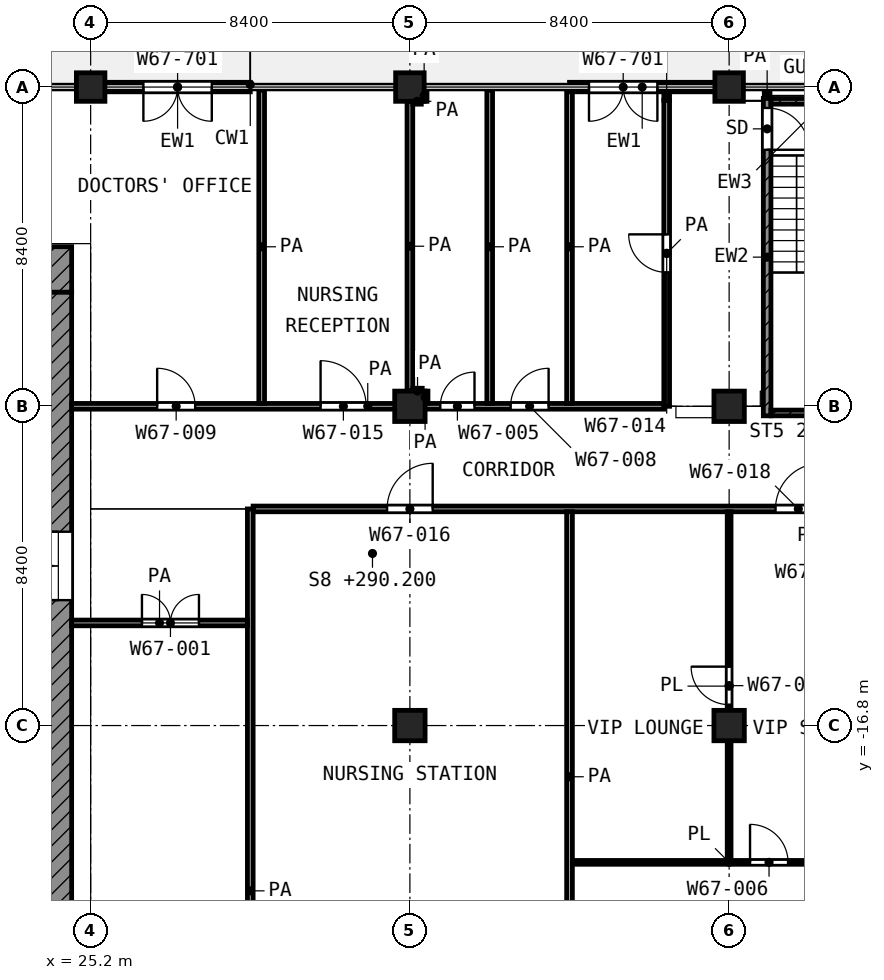
"""IFC4 building model, lengths in metres.
Left out: names, types, materials, properties, quantities, classifications, styles, units other than length and angle.
Written with IfcOpenShell. Run it as: python <this file> out.ifc"""

import sys

from ifc_helpers import new_model, si_unit, direction, frame, frame_2d, origin, origin_2d, place, context, subcontext, project, spatial, rectangle, extrude, element, fill, save


model = new_model("IFC4")
c1 = context("Model", 3, precision=1e-05, world=origin(), true_north=direction((0.0, 1.0)))
c2 = subcontext(c1, "Body", "Model", "MODEL_VIEW")
j1 = project(units=[si_unit("LENGTHUNIT", "METRE"), si_unit("PLANEANGLEUNIT", "RADIAN")], contexts=[c1])
p1 = place(None, origin())
s1 = spatial("IfcSite", under=j1, at=p1, CompositionType="ELEMENT")
p2 = place(p1, origin())
s2 = spatial("IfcBuilding", under=s1, at=p2, CompositionType="ELEMENT")
p3 = place(p2, frame((0.0, 0.0, 290.2)))
s3 = spatial("IfcBuildingStorey", under=s2, at=p3, CompositionType="ELEMENT", Elevation=290.2)
for number, where, z_axis, x_axis in (
    (1, (25.2, 0.0, 0.0), (0.0, 0.0, 1.0), (1.0, 0.0, 0.0)),
    (2, (33.6, 0.0, 0.0), (0.0, 0.0, 1.0), (1.0, 0.0, 0.0)),
    (3, (42.0, 0.0, 0.0), (0.0, 0.0, 1.0), (1.0, 0.0, 0.0)),
):
    element("IfcColumn", number, at=place(p3, frame(where, z_axis=z_axis, x_axis=x_axis)), inside=s3, PredefinedType="COLUMN", context=c2, shape_type="SweptSolid", body=[
        extrude(rectangle(XDim=0.75, YDim=0.75, at=origin_2d()), origin(), (0.0, 0.0, 1.0), 4.2),
    ])
for number, where, z_axis, x_axis in (
    (4, (33.6, -8.4, 0.0), (0.0, 0.0, 1.0), (1.0, 0.0, 0.0)),
    (5, (42.0, -8.4, 0.0), (0.0, 0.0, 1.0), (1.0, 0.0, 0.0)),
    (6, (33.6, -16.8, 0.0), (0.0, 0.0, 1.0), (1.0, 0.0, 0.0)),
    (7, (42.0, -16.8, 0.0), (0.0, 0.0, 1.0), (1.0, 0.0, 0.0)),
):
    element("IfcColumn", number, at=place(p3, frame(where, z_axis=z_axis, x_axis=x_axis)), inside=s3, PredefinedType="COLUMN", context=c2, shape_type="SweptSolid", body=[
        extrude(rectangle(XDim=0.8, YDim=0.8, at=origin_2d()), origin(), (0.0, 0.0, 1.0), 4.2),
    ])
p4 = place(p3, frame((41.625, 0.0, 0.0), z_axis=(0.0, 0.0, 1.0), x_axis=(-1.0, 0.0, 0.0)))
e8 = element("IfcWall", 8, at=p4, inside=s3, PredefinedType="SOLIDWALL", context=c2, shape_type="SweptSolid", body=[
    extrude(rectangle(XDim=3.825, YDim=0.25, at=frame_2d((1.913, 0.0))), origin(), (0.0, 0.0, 1.0), 3.48),
])
p5 = place(p4, frame((1.512, 0.0, 0.0)))
e9 = element("IfcOpeningElement", 9, at=p5, cuts=e8, PredefinedType="OPENING", context=c2, shape_type="SweptSolid", body=[
    extrude(rectangle(XDim=1.8, YDim=2.1, at=frame_2d((0.9, 1.05))), frame((0.0, 0.135, 0.0), z_axis=(0.0, -1.0, 0.0), x_axis=(1.0, 0.0, 0.0)), (0.0, 0.0, 1.0), 0.27),
])
p6 = place(p3, frame((29.4, 0.0, 0.0), z_axis=(0.0, 0.0, 1.0), x_axis=(-1.0, 0.0, 0.0)))
e10 = element("IfcWall", 10, at=p6, inside=s3, PredefinedType="SOLIDWALL", context=c2, shape_type="SweptSolid", body=[
    extrude(rectangle(XDim=3.825, YDim=0.25, at=frame_2d((1.913, 0.0))), origin(), (0.0, 0.0, 1.0), 3.48),
])
p7 = place(p6, frame((1.012, 0.0, 0.0)))
e11 = element("IfcOpeningElement", 11, at=p7, cuts=e10, PredefinedType="OPENING", context=c2, shape_type="SweptSolid", body=[
    extrude(rectangle(XDim=1.8, YDim=2.1, at=frame_2d((0.9, 1.05))), frame((0.0, 0.135, 0.0), z_axis=(0.0, -1.0, 0.0), x_axis=(1.0, 0.0, 0.0)), (0.0, 0.0, 1.0), 0.27),
])
p8 = place(p3, frame((4.2, -4.8, 0.0), z_axis=(0.0, 0.0, 1.0), x_axis=(1.0, 0.0, 0.0)))
e12 = element("IfcWall", 12, at=p8, inside=s3, PredefinedType="SHEAR", context=c2, shape_type="SweptSolid", body=[
    extrude(rectangle(XDim=20.5, YDim=1.2, at=frame_2d((10.25, 0.0))), origin(), (0.0, 0.0, 1.0), 3.6),
])
p9 = place(p8, frame((1.95, 0.0, 0.0)))
e13 = element("IfcOpeningElement", 13, at=p9, cuts=e12, PredefinedType="OPENING", context=c2, shape_type="SweptSolid", body=[
    extrude(rectangle(XDim=1.1, YDim=2.1, at=frame_2d((0.55, 1.05))), frame((0.0, 0.61, 0.0), z_axis=(0.0, -1.0, 0.0), x_axis=(1.0, 0.0, 0.0)), (0.0, 0.0, 1.0), 1.22),
])
p10 = place(p8, frame((17.95, 0.0, 0.0)))
e14 = element("IfcOpeningElement", 14, at=p10, cuts=e12, PredefinedType="OPENING", context=c2, shape_type="SweptSolid", body=[
    extrude(rectangle(XDim=1.1, YDim=2.1, at=frame_2d((0.55, 1.05))), frame((0.0, 0.61, 0.0), z_axis=(0.0, -1.0, 0.0), x_axis=(1.0, 0.0, 0.0)), (0.0, 0.0, 1.0), 1.22),
])
p11 = place(p3, frame((24.35, -24.0, 0.0), z_axis=(0.0, 0.0, 1.0), x_axis=(0.0, 1.0, 0.0)))
e15 = element("IfcWall", 15, at=p11, inside=s3, PredefinedType="SHEAR", context=c2, shape_type="SweptSolid", body=[
    extrude(rectangle(XDim=18.6, YDim=0.7, at=frame_2d((9.3, 0.0))), origin(), (0.0, 0.0, 1.0), 3.6),
])
p12 = place(p11, frame((10.5, 0.0, 0.0)))
e16 = element("IfcOpeningElement", 16, at=p12, cuts=e15, PredefinedType="OPENING", context=c2, shape_type="SweptSolid", body=[
    extrude(rectangle(XDim=1.8, YDim=2.1, at=frame_2d((0.9, 1.05))), frame((0.0, 0.36, 0.0), z_axis=(0.0, -1.0, 0.0), x_axis=(1.0, 0.0, 0.0)), (0.0, 0.0, 1.0), 0.72),
])
p13 = place(p3, frame((43.0, -8.65, 0.0), z_axis=(0.0, 0.0, 1.0), x_axis=(0.0, 1.0, 0.0)))
e17 = element("IfcWall", 17, at=p13, inside=s3, PredefinedType="SHEAR", context=c2, shape_type="SweptSolid", body=[
    extrude(rectangle(XDim=8.35, YDim=0.2, at=frame_2d((4.175, 0.0))), origin(), (0.0, 0.0, 1.0), 3.6),
])
p14 = place(p13, frame((7.0, 0.0, 0.0)))
e18 = element("IfcOpeningElement", 18, at=p14, cuts=e17, PredefinedType="OPENING", context=c2, shape_type="SweptSolid", body=[
    extrude(rectangle(XDim=1.1, YDim=2.1, at=frame_2d((0.55, 1.05))), frame((0.0, 0.11, 0.0), z_axis=(0.0, -1.0, 0.0), x_axis=(1.0, 0.0, 0.0)), (0.0, 0.0, 1.0), 0.22),
])
for number, where, z_axis, x_axis in (
    (19, (43.1, -0.375, 0.0), (0.0, 0.0, 1.0), (1.0, 0.0, 0.0)),
    (20, (43.1, -8.575, 0.0), (0.0, 0.0, 1.0), (1.0, 0.0, 0.0)),
):
    element("IfcWall", number, at=place(p3, frame(where, z_axis=z_axis, x_axis=x_axis)), inside=s3, PredefinedType="SHEAR", context=c2, shape_type="SweptSolid", body=[
        extrude(rectangle(XDim=2.85, YDim=0.15, at=frame_2d((1.425, 0.0))), origin(), (0.0, 0.0, 1.0), 3.6),
    ])
p15 = place(p3, frame((37.875, -20.4, 0.0), z_axis=(0.0, 0.0, 1.0), x_axis=(1.0, 0.0, 0.0)))
e21 = element("IfcWall", 21, at=p15, inside=s3, PredefinedType="PARTITIONING", context=c2, shape_type="SweptSolid", body=[
    extrude(rectangle(XDim=8.25, YDim=0.1, at=frame_2d((4.125, 0.0))), origin(), (0.0, 0.0, 1.0), 3.6),
])
p16 = place(p15, frame((4.675, 0.0, 0.0)))
e22 = element("IfcOpeningElement", 22, at=p16, cuts=e21, PredefinedType="OPENING", context=c2, shape_type="SweptSolid", body=[
    extrude(rectangle(XDim=1.0, YDim=2.1, at=frame_2d((0.5, 1.05))), frame((0.0, 0.06, 0.0), z_axis=(0.0, -1.0, 0.0), x_axis=(1.0, 0.0, 0.0)), (0.0, 0.0, 1.0), 0.12),
])
p17 = place(p3, frame((42.0, -20.35, 0.0), z_axis=(0.0, 0.0, 1.0), x_axis=(0.0, 1.0, 0.0)))
e23 = element("IfcWall", 23, at=p17, inside=s3, PredefinedType="PARTITIONING", context=c2, shape_type="SweptSolid", body=[
    extrude(rectangle(XDim=9.175, YDim=0.1, at=frame_2d((4.587, 0.0))), origin(), (0.0, 0.0, 1.0), 3.6),
])
p18 = place(p17, frame((4.1, 0.0, 0.0)))
e24 = element("IfcOpeningElement", 24, at=p18, cuts=e23, PredefinedType="OPENING", context=c2, shape_type="SweptSolid", body=[
    extrude(rectangle(XDim=1.0, YDim=2.1, at=frame_2d((0.5, 1.05))), frame((0.0, 0.06, 0.0), z_axis=(0.0, -1.0, 0.0), x_axis=(1.0, 0.0, 0.0)), (0.0, 0.0, 1.0), 0.12),
])
p19 = place(p3, frame((24.7, -14.1, 0.0), z_axis=(0.0, 0.0, 1.0), x_axis=(1.0, 0.0, 0.0)))
e25 = element("IfcWall", 25, at=p19, inside=s3, PredefinedType="PARTITIONING", context=c2, shape_type="SweptSolid", body=[
    extrude(rectangle(XDim=4.625, YDim=0.15, at=frame_2d((2.312, 0.0))), origin(), (0.0, 0.0, 1.0), 3.6),
])
p20 = place(p19, frame((1.85, 0.0, 0.0)))
e26 = element("IfcOpeningElement", 26, at=p20, cuts=e25, PredefinedType="OPENING", context=c2, shape_type="SweptSolid", body=[
    extrude(rectangle(XDim=1.5, YDim=2.1, at=frame_2d((0.75, 1.05))), frame((0.0, 0.085, 0.0), z_axis=(0.0, -1.0, 0.0), x_axis=(1.0, 0.0, 0.0)), (0.0, 0.0, 1.0), 0.17),
])
p21 = place(p3, frame((29.475, -11.1, 0.0), z_axis=(0.0, 0.0, 1.0), x_axis=(1.0, 0.0, 0.0)))
e27 = element("IfcWall", 27, at=p21, inside=s3, PredefinedType="PARTITIONING", context=c2, shape_type="SweptSolid", body=[
    extrude(rectangle(XDim=29.245, YDim=0.15, at=frame_2d((14.623, 0.0))), origin(), (0.0, 0.0, 1.0), 3.6),
])
p22 = place(p21, frame((3.525, 0.0, 0.0)))
e28 = element("IfcOpeningElement", 28, at=p22, cuts=e27, PredefinedType="OPENING", context=c2, shape_type="SweptSolid", body=[
    extrude(rectangle(XDim=1.2, YDim=2.1, at=frame_2d((0.6, 1.05))), frame((0.0, 0.085, 0.0), z_axis=(0.0, -1.0, 0.0), x_axis=(1.0, 0.0, 0.0)), (0.0, 0.0, 1.0), 0.17),
])
p23 = place(p21, frame((15.285, 0.0, 0.0)))
e29 = element("IfcOpeningElement", 29, at=p23, cuts=e27, PredefinedType="OPENING", context=c2, shape_type="SweptSolid", body=[
    extrude(rectangle(XDim=1.2, YDim=2.1, at=frame_2d((0.6, 1.05))), frame((0.0, 0.085, 0.0), z_axis=(0.0, -1.0, 0.0), x_axis=(1.0, 0.0, 0.0)), (0.0, 0.0, 1.0), 0.17),
])
p24 = place(p21, frame((13.745, 0.0, 0.0)))
e30 = element("IfcOpeningElement", 30, at=p24, cuts=e27, PredefinedType="OPENING", context=c2, shape_type="SweptSolid", body=[
    extrude(rectangle(XDim=1.2, YDim=2.1, at=frame_2d((0.6, 1.05))), frame((0.0, 0.085, 0.0), z_axis=(0.0, -1.0, 0.0), x_axis=(1.0, 0.0, 0.0)), (0.0, 0.0, 1.0), 0.17),
])
p25 = place(p21, frame((18.325, 0.0, 0.0)))
e31 = element("IfcOpeningElement", 31, at=p25, cuts=e27, PredefinedType="OPENING", context=c2, shape_type="SweptSolid", body=[
    extrude(rectangle(XDim=1.0, YDim=2.1, at=frame_2d((0.5, 1.05))), frame((0.0, 0.085, 0.0), z_axis=(0.0, -1.0, 0.0), x_axis=(1.0, 0.0, 0.0)), (0.0, 0.0, 1.0), 0.17),
])
p26 = place(p21, frame((24.375, 0.0, 0.0)))
e32 = element("IfcOpeningElement", 32, at=p26, cuts=e27, PredefinedType="OPENING", context=c2, shape_type="SweptSolid", body=[
    extrude(rectangle(XDim=1.5, YDim=2.1, at=frame_2d((0.75, 1.05))), frame((0.0, 0.085, 0.0), z_axis=(0.0, -1.0, 0.0), x_axis=(1.0, 0.0, 0.0)), (0.0, 0.0, 1.0), 0.17),
])
p27 = place(p3, frame((24.7, -8.4, 0.0), z_axis=(0.0, 0.0, 1.0), x_axis=(1.0, 0.0, 0.0)))
e33 = element("IfcWall", 33, at=p27, inside=s3, PredefinedType="PARTITIONING", context=c2, shape_type="SweptSolid", body=[
    extrude(rectangle(XDim=15.582, YDim=0.15, at=frame_2d((7.791, 0.0))), origin(), (0.0, 0.0, 1.0), 3.6),
])
p28 = place(p27, frame((2.25, 0.0, 0.0)))
e34 = element("IfcOpeningElement", 34, at=p28, cuts=e33, PredefinedType="OPENING", context=c2, shape_type="SweptSolid", body=[
    extrude(rectangle(XDim=1.0, YDim=2.1, at=frame_2d((0.5, 1.05))), frame((0.0, 0.085, 0.0), z_axis=(0.0, -1.0, 0.0), x_axis=(1.0, 0.0, 0.0)), (0.0, 0.0, 1.0), 0.17),
])
p29 = place(p27, frame((6.55, 0.0, 0.0)))
e35 = element("IfcOpeningElement", 35, at=p29, cuts=e33, PredefinedType="OPENING", context=c2, shape_type="SweptSolid", body=[
    extrude(rectangle(XDim=1.2, YDim=2.1, at=frame_2d((0.6, 1.05))), frame((0.0, 0.085, 0.0), z_axis=(0.0, -1.0, 0.0), x_axis=(1.0, 0.0, 0.0)), (0.0, 0.0, 1.0), 0.17),
])
p30 = place(p27, frame((9.7, 0.0, 0.0)))
e36 = element("IfcOpeningElement", 36, at=p30, cuts=e33, PredefinedType="OPENING", context=c2, shape_type="SweptSolid", body=[
    extrude(rectangle(XDim=0.9, YDim=2.1, at=frame_2d((0.45, 1.05))), frame((0.0, 0.085, 0.0), z_axis=(0.0, -1.0, 0.0), x_axis=(1.0, 0.0, 0.0)), (0.0, 0.0, 1.0), 0.17),
])
p31 = place(p27, frame((11.55, 0.0, 0.0)))
e37 = element("IfcOpeningElement", 37, at=p31, cuts=e33, PredefinedType="OPENING", context=c2, shape_type="SweptSolid", body=[
    extrude(rectangle(XDim=1.0, YDim=2.1, at=frame_2d((0.5, 1.05))), frame((0.0, 0.085, 0.0), z_axis=(0.0, -1.0, 0.0), x_axis=(1.0, 0.0, 0.0)), (0.0, 0.0, 1.0), 0.17),
])
p32 = place(p3, frame((33.677, -8.0, 0.0), z_axis=(0.0, 0.0, 1.0), x_axis=(1.0, 0.0, 0.0)))
e38 = element("IfcWall", 38, at=p32, inside=s3, PredefinedType="PARTITIONING", context=c2, shape_type="SweptSolid", body=[
    extrude(rectangle(XDim=0.248, YDim=0.15, at=frame_2d((0.124, 0.0))), origin(), (0.0, 0.0, 1.0), 3.6),
])
p33 = place(p3, frame((33.678, -0.375, 0.0), z_axis=(0.0, 0.0, 1.0), x_axis=(1.0, 0.0, 0.0)))
e39 = element("IfcWall", 39, at=p33, inside=s3, PredefinedType="PARTITIONING", context=c2, shape_type="SweptSolid", body=[
    extrude(rectangle(XDim=0.222, YDim=0.15, at=frame_2d((0.111, 0.0))), origin(), (0.0, 0.0, 1.0), 3.6),
])
p34 = place(p3, frame((29.4, -31.198, 0.0), z_axis=(0.0, 0.0, 1.0), x_axis=(0.0, 1.0, 0.0)))
e40 = element("IfcWall", 40, at=p34, inside=s3, PredefinedType="PARTITIONING", context=c2, shape_type="SweptSolid", body=[
    extrude(rectangle(XDim=20.098, YDim=0.15, at=frame_2d((10.049, 0.0))), origin(), (0.0, 0.0, 1.0), 3.6),
])
p35 = place(p3, frame((29.7, -8.325, 0.0), z_axis=(0.0, 0.0, 1.0), x_axis=(0.0, 1.0, 0.0)))
e41 = element("IfcWall", 41, at=p35, inside=s3, PredefinedType="PARTITIONING", context=c2, shape_type="SweptSolid", body=[
    extrude(rectangle(XDim=8.245, YDim=0.15, at=frame_2d((4.123, 0.0))), origin(), (0.0, 0.0, 1.0), 3.6),
])
p36 = place(p3, frame((33.6, -7.998, 0.0), z_axis=(0.0, 0.0, 1.0), x_axis=(0.0, 1.0, 0.0)))
e42 = element("IfcWall", 42, at=p36, inside=s3, PredefinedType="PARTITIONING", context=c2, shape_type="SweptSolid", body=[
    extrude(rectangle(XDim=7.62, YDim=0.15, at=frame_2d((3.81, 0.0))), origin(), (0.0, 0.0, 1.0), 3.6),
])
p37 = place(p3, frame((33.975, -0.375, 0.0), z_axis=(0.0, 0.0, 1.0), x_axis=(0.0, 1.0, 0.0)))
e43 = element("IfcWall", 43, at=p37, inside=s3, PredefinedType="PARTITIONING", context=c2, shape_type="SweptSolid", body=[
    extrude(rectangle(XDim=0.295, YDim=0.15, at=frame_2d((0.147, 0.0))), origin(), (0.0, 0.0, 1.0), 3.6),
])
p38 = place(p3, frame((34.0, -8.325, 0.0), z_axis=(0.0, 0.0, 1.0), x_axis=(0.0, 1.0, 0.0)))
e44 = element("IfcWall", 44, at=p38, inside=s3, PredefinedType="PARTITIONING", context=c2, shape_type="SweptSolid", body=[
    extrude(rectangle(XDim=0.325, YDim=0.15, at=frame_2d((0.163, 0.0))), origin(), (0.0, 0.0, 1.0), 3.6),
])
p39 = place(p3, frame((35.7, -8.325, 0.0), z_axis=(0.0, 0.0, 1.0), x_axis=(0.0, 1.0, 0.0)))
e45 = element("IfcWall", 45, at=p39, inside=s3, PredefinedType="PARTITIONING", context=c2, shape_type="SweptSolid", body=[
    extrude(rectangle(XDim=8.245, YDim=0.15, at=frame_2d((4.123, 0.0))), origin(), (0.0, 0.0, 1.0), 3.6),
])
p40 = place(p3, frame((37.8, -25.12, 0.0), z_axis=(0.0, 0.0, 1.0), x_axis=(0.0, 1.0, 0.0)))
e46 = element("IfcWall", 46, at=p40, inside=s3, PredefinedType="PARTITIONING", context=c2, shape_type="SweptSolid", body=[
    extrude(rectangle(XDim=13.945, YDim=0.15, at=frame_2d((6.973, 0.0))), origin(), (0.0, 0.0, 1.0), 3.6),
])
p41 = place(p3, frame((37.8, -8.325, 0.0), z_axis=(0.0, 0.0, 1.0), x_axis=(0.0, 1.0, 0.0)))
e47 = element("IfcWall", 47, at=p41, inside=s3, PredefinedType="PARTITIONING", context=c2, shape_type="SweptSolid", body=[
    extrude(rectangle(XDim=8.245, YDim=0.15, at=frame_2d((4.123, 0.0))), origin(), (0.0, 0.0, 1.0), 3.6),
])
p42 = place(p3, frame((40.357, -8.4, 0.0), z_axis=(0.0, 0.0, 1.0), x_axis=(0.0, 1.0, 0.0)))
e48 = element("IfcWall", 48, at=p42, inside=s3, PredefinedType="PARTITIONING", context=c2, shape_type="SweptSolid", body=[
    extrude(rectangle(XDim=8.048, YDim=0.15, at=frame_2d((4.024, 0.0))), origin(), (0.0, 0.0, 1.0), 3.6),
])
p43 = place(p42, frame((3.524, 0.0, 0.0)))
e49 = element("IfcOpeningElement", 49, at=p43, cuts=e48, PredefinedType="OPENING", context=c2, shape_type="SweptSolid", body=[
    extrude(rectangle(XDim=1.0, YDim=2.1, at=frame_2d((0.5, 1.05))), frame((0.0, 0.085, 0.0), z_axis=(0.0, -1.0, 0.0), x_axis=(1.0, 0.0, 0.0)), (0.0, 0.0, 1.0), 0.17),
])
p44 = place(p3, frame((40.357, -0.35, 0.0), z_axis=(0.0, 0.0, 1.0), x_axis=(0.0, 1.0, 0.0)))
e50 = element("IfcWall", 50, at=p44, inside=s3, PredefinedType="PARTITIONING", context=c2, shape_type="SweptSolid", body=[
    extrude(rectangle(XDim=0.27, YDim=0.15, at=frame_2d((0.135, 0.0))), origin(), (0.0, 0.0, 1.0), 3.6),
])
p45 = place(p3, frame((43.0, -0.27, 0.0), z_axis=(0.0, 0.0, 1.0), x_axis=(0.0, 1.0, 0.0)))
e51 = element("IfcWall", 51, at=p45, inside=s3, PredefinedType="PARTITIONING", context=c2, shape_type="SweptSolid", body=[
    extrude(rectangle(XDim=0.19, YDim=0.15, at=frame_2d((0.095, 0.0))), origin(), (0.0, 0.0, 1.0), 3.6),
])
p46 = place(p5, origin())
e52 = element("IfcDoor", 52, at=p46, inside=s3, OperationType="DOUBLE_DOOR_SINGLE_SWING", PredefinedType="DOOR", context=c2, shape_type="SweptSolid", body=[
    extrude(rectangle(XDim=1.8, YDim=2.1, at=frame_2d((0.9, 1.05))), frame((0.0, 0.025, 0.0), z_axis=(0.0, -1.0, 0.0), x_axis=(1.0, 0.0, 0.0)), (0.0, 0.0, 1.0), 0.05),
])
fill(e9, e52)
p47 = place(p7, origin())
e53 = element("IfcDoor", 53, at=p47, inside=s3, OperationType="DOUBLE_DOOR_SINGLE_SWING", PredefinedType="DOOR", context=c2, shape_type="SweptSolid", body=[
    extrude(rectangle(XDim=1.8, YDim=2.1, at=frame_2d((0.9, 1.05))), frame((0.0, 0.025, 0.0), z_axis=(0.0, -1.0, 0.0), x_axis=(1.0, 0.0, 0.0)), (0.0, 0.0, 1.0), 0.05),
])
fill(e11, e53)
p48 = place(p12, origin())
e54 = element("IfcDoor", 54, at=p48, inside=s3, OperationType="DOUBLE_DOOR_SINGLE_SWING", PredefinedType="DOOR", context=c2, shape_type="SweptSolid", body=[
    extrude(rectangle(XDim=1.8, YDim=2.1, at=frame_2d((0.9, 1.05))), frame((0.0, 0.025, 0.0), z_axis=(0.0, -1.0, 0.0), x_axis=(1.0, 0.0, 0.0)), (0.0, 0.0, 1.0), 0.05),
])
fill(e16, e54)
p49 = place(p14, frame((1.1, 0.0, 0.0), z_axis=(0.0, 0.0, 1.0), x_axis=(-1.0, 0.0, 0.0)))
e55 = element("IfcDoor", 55, at=p49, inside=s3, OperationType="SINGLE_SWING_LEFT", PredefinedType="DOOR", context=c2, shape_type="SweptSolid", body=[
    extrude(rectangle(XDim=1.1, YDim=2.1, at=frame_2d((0.55, 1.05))), frame((0.0, 0.025, 0.0), z_axis=(0.0, -1.0, 0.0), x_axis=(1.0, 0.0, 0.0)), (0.0, 0.0, 1.0), 0.05),
])
fill(e18, e55)
p50 = place(p20, origin())
e56 = element("IfcDoor", 56, at=p50, inside=s3, OperationType="DOUBLE_DOOR_SINGLE_SWING", PredefinedType="DOOR", context=c2, shape_type="SweptSolid", body=[
    extrude(rectangle(XDim=1.5, YDim=2.1, at=frame_2d((0.75, 1.05))), frame((0.0, 0.025, 0.0), z_axis=(0.0, -1.0, 0.0), x_axis=(1.0, 0.0, 0.0)), (0.0, 0.0, 1.0), 0.05),
])
fill(e26, e56)
p51 = place(p28, origin())
e57 = element("IfcDoor", 57, at=p51, inside=s3, OperationType="SINGLE_SWING_LEFT", PredefinedType="DOOR", context=c2, shape_type="SweptSolid", body=[
    extrude(rectangle(XDim=1.0, YDim=2.1, at=frame_2d((0.5, 1.05))), frame((0.0, 0.025, 0.0), z_axis=(0.0, -1.0, 0.0), x_axis=(1.0, 0.0, 0.0)), (0.0, 0.0, 1.0), 0.05),
])
fill(e34, e57)
p52 = place(p29, origin())
e58 = element("IfcDoor", 58, at=p52, inside=s3, OperationType="SINGLE_SWING_LEFT", PredefinedType="DOOR", context=c2, shape_type="SweptSolid", body=[
    extrude(rectangle(XDim=1.2, YDim=2.1, at=frame_2d((0.6, 1.05))), frame((0.0, 0.025, 0.0), z_axis=(0.0, -1.0, 0.0), x_axis=(1.0, 0.0, 0.0)), (0.0, 0.0, 1.0), 0.05),
])
fill(e35, e58)
p53 = place(p22, origin())
e59 = element("IfcDoor", 59, at=p53, inside=s3, OperationType="SINGLE_SWING_RIGHT", PredefinedType="DOOR", context=c2, shape_type="SweptSolid", body=[
    extrude(rectangle(XDim=1.2, YDim=2.1, at=frame_2d((0.6, 1.05))), frame((0.0, 0.025, 0.0), z_axis=(0.0, -1.0, 0.0), x_axis=(1.0, 0.0, 0.0)), (0.0, 0.0, 1.0), 0.05),
])
fill(e28, e59)
p54 = place(p24, origin())
e60 = element("IfcDoor", 60, at=p54, inside=s3, OperationType="SINGLE_SWING_RIGHT", PredefinedType="DOOR", context=c2, shape_type="SweptSolid", body=[
    extrude(rectangle(XDim=1.2, YDim=2.1, at=frame_2d((0.6, 1.05))), frame((0.0, 0.025, 0.0), z_axis=(0.0, -1.0, 0.0), x_axis=(1.0, 0.0, 0.0)), (0.0, 0.0, 1.0), 0.05),
])
fill(e30, e60)
p55 = place(p16, origin())
e61 = element("IfcDoor", 61, at=p55, inside=s3, OperationType="SINGLE_SWING_LEFT", PredefinedType="DOOR", context=c2, shape_type="SweptSolid", body=[
    extrude(rectangle(XDim=1.0, YDim=2.1, at=frame_2d((0.5, 1.05))), frame((0.0, 0.025, 0.0), z_axis=(0.0, -1.0, 0.0), x_axis=(1.0, 0.0, 0.0)), (0.0, 0.0, 1.0), 0.05),
])
fill(e22, e61)
p56 = place(p18, origin())
e62 = element("IfcDoor", 62, at=p56, inside=s3, OperationType="SINGLE_SWING_RIGHT", PredefinedType="DOOR", context=c2, shape_type="SweptSolid", body=[
    extrude(rectangle(XDim=1.0, YDim=2.1, at=frame_2d((0.5, 1.05))), frame((0.0, 0.025, 0.0), z_axis=(0.0, -1.0, 0.0), x_axis=(1.0, 0.0, 0.0)), (0.0, 0.0, 1.0), 0.05),
])
fill(e24, e62)
p57 = place(p30, origin())
e63 = element("IfcDoor", 63, at=p57, inside=s3, OperationType="SINGLE_SWING_RIGHT", PredefinedType="DOOR", context=c2, shape_type="SweptSolid", body=[
    extrude(rectangle(XDim=0.9, YDim=2.1, at=frame_2d((0.45, 1.05))), frame((0.0, 0.025, 0.0), z_axis=(0.0, -1.0, 0.0), x_axis=(1.0, 0.0, 0.0)), (0.0, 0.0, 1.0), 0.05),
])
fill(e36, e63)
p58 = place(p31, origin())
e64 = element("IfcDoor", 64, at=p58, inside=s3, OperationType="SINGLE_SWING_RIGHT", PredefinedType="DOOR", context=c2, shape_type="SweptSolid", body=[
    extrude(rectangle(XDim=1.0, YDim=2.1, at=frame_2d((0.5, 1.05))), frame((0.0, 0.025, 0.0), z_axis=(0.0, -1.0, 0.0), x_axis=(1.0, 0.0, 0.0)), (0.0, 0.0, 1.0), 0.05),
])
fill(e37, e64)
p59 = place(p43, origin())
e65 = element("IfcDoor", 65, at=p59, inside=s3, OperationType="SINGLE_SWING_RIGHT", PredefinedType="DOOR", context=c2, shape_type="SweptSolid", body=[
    extrude(rectangle(XDim=1.0, YDim=2.1, at=frame_2d((0.5, 1.05))), frame((0.0, 0.025, 0.0), z_axis=(0.0, -1.0, 0.0), x_axis=(1.0, 0.0, 0.0)), (0.0, 0.0, 1.0), 0.05),
])
fill(e49, e65)
save(model, sys.argv[1])
